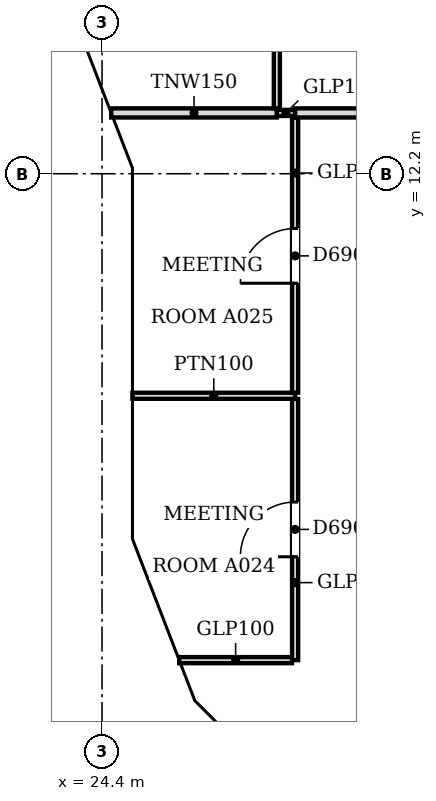
"""IFC4 building model, lengths in metres.
Left out: names, types, materials, properties, quantities, classifications, styles, units other than length and angle.
Written with IfcOpenShell. Run it as: python <this file> out.ifc"""

import sys

from ifc_helpers import new_model, si_unit, direction, frame, frame_2d, origin, place, context, subcontext, project, spatial, polyline, rectangle, outline, extrude, faceted_brep, source, transform, mapped, element, fill, save


model = new_model("IFC4")
c1 = context("Model", 3, precision=1e-05, world=origin(), true_north=direction((0.0, 1.0)))
c2 = subcontext(c1, "Body", "Model", "MODEL_VIEW")
j1 = project(units=[si_unit("LENGTHUNIT", "METRE"), si_unit("PLANEANGLEUNIT", "RADIAN")], contexts=[c1])
p1 = place(None, origin())
s1 = spatial("IfcSite", under=j1, at=p1, CompositionType="ELEMENT")
p2 = place(p1, origin())
s2 = spatial("IfcBuilding", under=s1, at=p2, CompositionType="ELEMENT")
p3 = place(p2, frame((0.0, 0.0, 197.9)))
s3 = spatial("IfcBuildingStorey", under=s2, at=p3, CompositionType="ELEMENT", Elevation=197.9)
m1 = source(origin(), c2, "Body", "Brep", [
    faceted_brep([(3.156, -0.25, 0.056), (0.106, -0.25, 3.736), (0.106, -0.25, 0.0), (3.156, -0.25, 0.0), (0.0, 0.25, 3.736), (0.053, 0.25, 3.8), (3.202, 0.25, 0.0), (0.0, 0.25, 0.0), (0.053, 0.0, 3.8), (3.202, -0.0, 0.0)], [[[0, 1, 2, 3]], [[4, 5, 6, 7]], [[6, 5, 8, 1, 0, 9]], [[5, 4, 8]], [[7, 6, 9, 3, 2]], [[7, 2, 1, 8, 4]], [[3, 9, 0]]]),
])
p4 = place(p3, frame((23.497, 15.234, 0.0), z_axis=(0.0, 0.0, 1.0), x_axis=(0.359913782069, -0.932985567668, 0.0)))
e1 = element("IfcWall", 1, at=p4, inside=s3, PredefinedType="SOLIDWALL", context=c2, shape_type="MappedRepresentation", body=[
    mapped(m1, transform((0.0, 0.0, 0.0), scale=1.0)),
])
m2 = source(origin(), c2, "Body", "SweptSolid", [
    extrude(outline(polyline([(2.671, 0.25), (0.253, 3.167), (0.253, 0.25), (2.671, 0.25)])), frame((0.0, 0.26, 0.0), z_axis=(0.0, -1.0, 0.0), x_axis=(1.0, 0.0, 0.0)), (0.0, 0.0, 1.0), 0.52),
])
p5 = place(p4, origin())
e2 = element("IfcOpeningElement", 2, at=p5, cuts=e1, PredefinedType="OPENING", context=c2, shape_type="MappedRepresentation", body=[
    mapped(m2, transform((0.0, 0.0, 0.0), scale=1.0)),
])
m3 = source(origin(), c2, "Body", "Brep", [
    faceted_brep([(6.1, -0.25, 0.0), (3.096, -0.25, 3.8), (0.047, -0.25, 0.057), (0.047, -0.25, 0.0), (0.0, 0.25, 0.0), (3.096, 0.25, 3.8), (6.053, 0.25, 0.059), (6.053, 0.25, 0.0), (6.1, -0.0, 0.0), (0.0, 0.0, 0.0)], [[[0, 1, 2, 3]], [[4, 5, 6, 7]], [[6, 5, 1, 0, 8]], [[5, 4, 9, 2, 1]], [[4, 7, 8, 0, 3, 9]], [[9, 3, 2]], [[8, 7, 6]]]),
])
p6 = place(p3, frame((24.65, 12.247, 0.0), z_axis=(0.0, 0.0, 1.0), x_axis=(0.0, -1.0, 0.0)))
e3 = element("IfcWall", 3, at=p6, inside=s3, PredefinedType="SOLIDWALL", context=c2, shape_type="MappedRepresentation", body=[
    mapped(m3, transform((0.0, 0.0, 0.0), scale=1.0)),
])
m4 = source(origin(), c2, "Body", "SweptSolid", [
    extrude(outline(polyline([(5.584, 0.25), (3.094, 3.401), (0.526, 0.25), (5.584, 0.25)])), frame((0.0, 0.26, 0.0), z_axis=(0.0, -1.0, 0.0), x_axis=(1.0, 0.0, 0.0)), (0.0, 0.0, 1.0), 0.52),
])
p7 = place(p6, origin())
e4 = element("IfcOpeningElement", 4, at=p7, cuts=e3, PredefinedType="OPENING", context=c2, shape_type="MappedRepresentation", body=[
    mapped(m4, transform((0.0, 0.0, 0.0), scale=1.0)),
])
m5 = source(origin(), c2, "Body", "Brep", [
    faceted_brep([(3.003, -0.25, 3.732), (2.95, -0.25, 3.8), (0.0, -0.25, 0.0), (3.003, -0.25, 0.0), (0.047, 0.25, 0.06), (2.898, 0.25, 3.732), (2.898, 0.25, 0.0), (0.047, 0.25, 0.0), (2.95, 0.0, 3.8), (0.0, 0.0, 0.0)], [[[0, 1, 2, 3]], [[4, 5, 6, 7]], [[8, 1, 0]], [[5, 4, 9, 2, 1, 8]], [[7, 6, 3, 2, 9]], [[7, 9, 4]], [[3, 6, 5, 8, 0]]]),
])
p8 = place(p3, frame((24.65, 6.146, 0.0), z_axis=(0.0, 0.0, 1.0), x_axis=(0.359953949349, -0.932970071518, 0.0)))
e5 = element("IfcWall", 5, at=p8, inside=s3, PredefinedType="SOLIDWALL", context=c2, shape_type="MappedRepresentation", body=[
    mapped(m5, transform((0.0, 0.0, 0.0), scale=1.0)),
])
m6 = source(origin(), c2, "Body", "SweptSolid", [
    extrude(outline(polyline([(2.75, 3.135), (0.511, 0.25), (2.75, 0.25), (2.75, 3.135)])), frame((0.0, 0.26, 0.0), z_axis=(0.0, -1.0, 0.0), x_axis=(1.0, 0.0, 0.0)), (0.0, 0.0, 1.0), 0.52),
])
p9 = place(p8, origin())
e6 = element("IfcOpeningElement", 6, at=p9, cuts=e5, PredefinedType="OPENING", context=c2, shape_type="MappedRepresentation", body=[
    mapped(m6, transform((0.0, 0.0, 0.0), scale=1.0)),
])
m7 = source(origin(), c2, "Body", "Brep", [
    faceted_brep([(2.997, -0.25, 0.0), (0.053, -0.25, 3.8), (0.0, -0.25, 3.732), (0.0, -0.25, 0.0), (0.106, 0.25, 3.732), (2.944, 0.25, 0.068), (2.944, 0.25, 0.0), (0.106, 0.25, 0.0), (0.053, 0.0, 3.8), (2.997, 0.0, 0.0)], [[[0, 1, 2, 3]], [[4, 5, 6, 7]], [[5, 4, 8, 1, 0, 9]], [[2, 1, 8]], [[7, 6, 9, 0, 3]], [[7, 3, 2, 8, 4]], [[9, 6, 5]]]),
])
p10 = place(p3, frame((25.675, 3.431, 0.0), z_axis=(0.0, 0.0, 1.0), x_axis=(0.707106781187, -0.707106781187, 0.0)))
e7 = element("IfcWall", 7, at=p10, inside=s3, PredefinedType="SOLIDWALL", context=c2, shape_type="MappedRepresentation", body=[
    mapped(m7, transform((0.0, 0.0, 0.0), scale=1.0)),
])
m8 = source(origin(), c2, "Body", "SweptSolid", [
    extrude(outline(polyline([(2.487, 0.25), (0.253, 3.134), (0.253, 0.25), (2.487, 0.25)])), frame((0.0, 0.26, 0.0), z_axis=(0.0, -1.0, 0.0), x_axis=(1.0, 0.0, 0.0)), (0.0, 0.0, 1.0), 0.52),
])
p11 = place(p10, origin())
e8 = element("IfcOpeningElement", 8, at=p11, cuts=e7, PredefinedType="OPENING", context=c2, shape_type="MappedRepresentation", body=[
    mapped(m8, transform((0.0, 0.0, 0.0), scale=1.0)),
])
p12 = place(p2, frame((0.0, 0.0, 201.7)))
s4 = spatial("IfcBuildingStorey", under=s2, at=p12, CompositionType="ELEMENT", Elevation=201.7)
m9 = source(origin(), c2, "Body", "Brep", [
    faceted_brep([(3.103, -0.25, 7.544), (0.053, -0.25, 3.864), (0.053, -0.25, 3.736), (3.103, -0.25, 0.056), (0.0, 0.25, 3.8), (3.149, 0.25, 7.6), (3.196, 0.25, 7.543), (3.196, 0.25, 0.057), (3.149, 0.25, 0.0), (3.149, -0.0, 0.0), (3.149, -0.0, 7.6), (0.0, 0.0, 3.8)], [[[0, 1, 2, 3]], [[4, 5, 6, 7, 8]], [[8, 7, 9]], [[6, 5, 10]], [[5, 4, 11, 1, 0, 10]], [[4, 8, 9, 3, 2, 11]], [[11, 2, 1]], [[3, 9, 7, 6, 10, 0]]]),
])
p13 = place(p12, frame((23.517, 15.185, -3.8), z_axis=(0.0, 0.0, 1.0), x_axis=(0.359864468756, -0.933004589553, 0.0)))
e9 = element("IfcWall", 9, at=p13, inside=s4, PredefinedType="SOLIDWALL", context=c2, shape_type="MappedRepresentation", body=[
    mapped(m9, transform((0.0, 0.0, 0.0), scale=1.0)),
])
m10 = source(origin(), c2, "Body", "SweptSolid", [
    extrude(outline(polyline([(2.949, 6.967), (0.325, 3.8), (2.949, 0.633), (2.949, 6.967)])), frame((0.0, 0.26, 0.0), z_axis=(0.0, -1.0, 0.0), x_axis=(1.0, 0.0, 0.0)), (0.0, 0.0, 1.0), 0.52),
])
p14 = place(p13, origin())
e10 = element("IfcOpeningElement", 10, at=p14, cuts=e9, PredefinedType="OPENING", context=c2, shape_type="MappedRepresentation", body=[
    mapped(m10, transform((0.0, 0.0, 0.0), scale=1.0)),
])
m11 = source(origin(), c2, "Body", "Brep", [
    faceted_brep([(0.093, -0.25, 0.057), (3.143, -0.25, 3.8), (0.093, -0.25, 7.543), (0.0, 0.25, 7.544), (0.047, 0.25, 7.6), (3.143, 0.25, 3.8), (0.047, 0.25, 0.0), (0.0, 0.25, 0.056), (0.047, 0.0, 0.0), (0.047, 0.0, 7.6)], [[[0, 1, 2]], [[3, 4, 5, 6, 7]], [[6, 5, 1, 0, 8]], [[5, 4, 9, 2, 1]], [[4, 3, 9]], [[7, 6, 8]], [[7, 8, 0, 2, 9, 3]]]),
])
p15 = place(p12, frame((24.65, 12.293, -3.8), z_axis=(0.0, 0.0, 1.0), x_axis=(0.0, -1.0, 0.0)))
e11 = element("IfcWall", 11, at=p15, inside=s4, PredefinedType="SOLIDWALL", context=c2, shape_type="MappedRepresentation", body=[
    mapped(m11, transform((0.0, 0.0, 0.0), scale=1.0)),
])
m12 = source(origin(), c2, "Body", "SweptSolid", [
    extrude(outline(polyline([(0.247, 0.641), (2.821, 3.8), (0.247, 6.959), (0.247, 0.641)])), frame((0.0, 0.26, 0.0), z_axis=(0.0, -1.0, 0.0), x_axis=(1.0, 0.0, 0.0)), (0.0, 0.0, 1.0), 0.52),
])
p16 = place(p15, origin())
e12 = element("IfcOpeningElement", 12, at=p16, cuts=e11, PredefinedType="OPENING", context=c2, shape_type="MappedRepresentation", body=[
    mapped(m12, transform((0.0, 0.0, 0.0), scale=1.0)),
])
m13 = source(origin(), c2, "Body", "Brep", [
    faceted_brep([(3.003, -0.25, 0.0), (3.05, -0.25, 0.06), (3.05, -0.25, 7.54), (3.003, -0.25, 7.6), (0.0, -0.25, 3.8), (0.0, 0.25, 3.8), (2.957, 0.25, 7.541), (2.957, 0.25, 0.059), (3.003, 0.0, 0.0), (3.003, 0.0, 7.6)], [[[0, 1, 2, 3, 4]], [[5, 6, 7]], [[1, 0, 8]], [[9, 3, 2]], [[6, 5, 4, 3, 9]], [[5, 7, 8, 0, 4]], [[1, 8, 7, 6, 9, 2]]]),
])
p17 = place(p12, frame((24.65, 9.15, -3.8), z_axis=(0.0, 0.0, 1.0), x_axis=(0.0, -1.0, 0.0)))
e13 = element("IfcWall", 13, at=p17, inside=s4, PredefinedType="SOLIDWALL", context=c2, shape_type="MappedRepresentation", body=[
    mapped(m13, transform((0.0, 0.0, 0.0), scale=1.0)),
])
m14 = source(origin(), c2, "Body", "SweptSolid", [
    extrude(outline(polyline([(2.803, 6.944), (0.319, 3.8), (2.803, 0.656), (2.803, 6.944)])), frame((0.0, 0.26, 0.0), z_axis=(0.0, -1.0, 0.0), x_axis=(1.0, 0.0, 0.0)), (0.0, 0.0, 1.0), 0.52),
])
p18 = place(p17, origin())
e14 = element("IfcOpeningElement", 14, at=p18, cuts=e13, PredefinedType="OPENING", context=c2, shape_type="MappedRepresentation", body=[
    mapped(m14, transform((0.0, 0.0, 0.0), scale=1.0)),
])
m15 = source(origin(), c2, "Body", "Brep", [
    faceted_brep([(0.047, -0.25, 0.0), (2.997, -0.25, 3.8), (0.047, -0.25, 7.6), (0.0, -0.25, 7.541), (0.0, -0.25, 0.059), (0.093, 0.25, 7.54), (2.944, 0.25, 3.868), (2.944, 0.25, 3.732), (0.093, 0.25, 0.06), (2.997, 0.0, 3.8), (0.047, 0.0, 0.0), (0.047, 0.0, 7.6)], [[[0, 1, 2, 3, 4]], [[5, 6, 7, 8]], [[8, 7, 9, 1, 0, 10]], [[6, 5, 11, 2, 1, 9]], [[3, 2, 11]], [[10, 0, 4]], [[8, 10, 4, 3, 11, 5]], [[9, 7, 6]]]),
])
p19 = place(p12, frame((24.633, 6.19, -3.8), z_axis=(0.0, 0.0, 1.0), x_axis=(0.359901446078, -0.932990326376, 0.0)))
e15 = element("IfcWall", 15, at=p19, inside=s4, PredefinedType="SOLIDWALL", context=c2, shape_type="MappedRepresentation", body=[
    mapped(m15, transform((0.0, 0.0, 0.0), scale=1.0)),
])
m16 = source(origin(), c2, "Body", "SweptSolid", [
    extrude(outline(polyline([(0.247, 0.665), (2.681, 3.8), (0.247, 6.935), (0.247, 0.665)])), frame((0.0, 0.26, 0.0), z_axis=(0.0, -1.0, 0.0), x_axis=(1.0, 0.0, 0.0)), (0.0, 0.0, 1.0), 0.52),
])
p20 = place(p19, origin())
e16 = element("IfcOpeningElement", 16, at=p20, cuts=e15, PredefinedType="OPENING", context=c2, shape_type="MappedRepresentation", body=[
    mapped(m16, transform((0.0, 0.0, 0.0), scale=1.0)),
])
m17 = source(origin(), c2, "Body", "Brep", [
    faceted_brep([(2.944, -0.25, 0.0), (2.997, -0.25, 0.068), (2.997, -0.25, 7.532), (2.944, -0.25, 7.6), (0.0, -0.25, 3.8), (0.053, 0.25, 3.868), (2.891, 0.25, 7.532), (2.891, 0.25, 0.068), (0.053, 0.25, 3.732), (2.944, 0.0, 0.0), (2.944, 0.0, 7.6), (0.0, 0.0, 3.8)], [[[0, 1, 2, 3, 4]], [[5, 6, 7, 8]], [[1, 0, 9]], [[10, 3, 2]], [[6, 5, 11, 4, 3, 10]], [[8, 7, 9, 0, 4, 11]], [[8, 11, 5]], [[1, 9, 7, 6, 10, 2]]]),
])
p21 = place(p12, frame((25.712, 3.394, -3.8), z_axis=(0.0, 0.0, 1.0), x_axis=(0.707066050402, -0.707147509625, 0.0)))
e17 = element("IfcWall", 17, at=p21, inside=s4, PredefinedType="SOLIDWALL", context=c2, shape_type="MappedRepresentation", body=[
    mapped(m17, transform((0.0, 0.0, 0.0), scale=1.0)),
])
m18 = source(origin(), c2, "Body", "SweptSolid", [
    extrude(outline(polyline([(2.744, 6.934), (0.316, 3.8), (2.744, 0.667), (2.744, 6.934)])), frame((0.0, 0.26, 0.0), z_axis=(0.0, -1.0, 0.0), x_axis=(1.0, 0.0, 0.0)), (0.0, 0.0, 1.0), 0.52),
])
p22 = place(p21, origin())
e18 = element("IfcOpeningElement", 18, at=p22, cuts=e17, PredefinedType="OPENING", context=c2, shape_type="MappedRepresentation", body=[
    mapped(m18, transform((0.0, 0.0, 0.0), scale=1.0)),
])
p23 = place(p3, frame((25.669, 4.2, 0.0), z_axis=(0.0, 0.0, 1.0), x_axis=(1.0, 0.0, 0.0)))
e19 = element("IfcWall", 19, at=p23, inside=s3, PredefinedType="PARTITIONING", context=c2, shape_type="SweptSolid", body=[
    extrude(rectangle(XDim=1.855, YDim=0.1, at=frame_2d((0.928, 0.0))), origin(), (0.0, 0.0, 1.0), 3.067),
])
p24 = place(p3, frame((27.575, 4.2, 0.0), z_axis=(0.0, 0.0, 1.0), x_axis=(0.0, 1.0, 0.0)))
e20 = element("IfcWall", 20, at=p24, inside=s3, PredefinedType="PARTITIONING", context=c2, shape_type="SweptSolid", body=[
    extrude(rectangle(XDim=4.297, YDim=0.1, at=frame_2d((2.148, 0.0))), origin(), (0.0, 0.0, 1.0), 3.067),
])
m19 = source(origin(), c2, "Body", "SweptSolid", [
    extrude(rectangle(XDim=0.9, YDim=2.1, at=frame_2d((0.45, 1.05))), frame((0.0, 0.06, 0.0), z_axis=(0.0, -1.0, 0.0), x_axis=(1.0, 0.0, 0.0)), (0.0, 0.0, 1.0), 0.12),
])
p25 = place(p24, frame((1.7, 0.0, 0.0)))
e21 = element("IfcOpeningElement", 21, at=p25, cuts=e20, PredefinedType="OPENING", context=c2, shape_type="MappedRepresentation", body=[
    mapped(m19, transform((0.0, 0.0, 0.0), scale=1.0)),
])
p26 = place(p3, frame((24.9, 8.548, 0.0), z_axis=(0.0, 0.0, 1.0), x_axis=(1.0, 0.0, 0.0)))
e22 = element("IfcWall", 22, at=p26, inside=s3, PredefinedType="PARTITIONING", context=c2, shape_type="SweptSolid", body=[
    extrude(rectangle(XDim=2.675, YDim=0.1, at=frame_2d((1.337, 0.0))), origin(), (0.0, 0.0, 1.0), 3.067),
])
p27 = place(p3, frame((27.575, 8.599, 0.0), z_axis=(0.0, 0.0, 1.0), x_axis=(0.0, 1.0, 0.0)))
e23 = element("IfcWall", 23, at=p27, inside=s3, PredefinedType="PARTITIONING", context=c2, shape_type="SweptSolid", body=[
    extrude(rectangle(XDim=4.525, YDim=0.1, at=frame_2d((2.263, 0.0))), origin(), (0.0, 0.0, 1.0), 3.067),
])
p28 = place(p27, frame((1.8, 0.0, 0.0)))
e24 = element("IfcOpeningElement", 24, at=p28, cuts=e23, PredefinedType="OPENING", context=c2, shape_type="MappedRepresentation", body=[
    mapped(m19, transform((0.0, 0.0, 0.0), scale=1.0)),
])
p29 = place(p3, frame((24.55, 13.2, 0.0), z_axis=(0.0, 0.0, 1.0), x_axis=(1.0, 0.0, 0.0)))
e25 = element("IfcWall", 25, at=p29, inside=s3, PredefinedType="PARTITIONING", context=c2, shape_type="SweptSolid", body=[
    extrude(rectangle(XDim=2.725, YDim=0.15, at=frame_2d((1.362, 0.0))), origin(), (0.0, 0.0, 1.0), 3.067),
])
p30 = place(p3, frame((27.276, 13.2, 0.0), z_axis=(0.0, 0.0, 1.0), x_axis=(1.0, 0.0, 0.0)))
e26 = element("IfcWall", 26, at=p30, inside=s3, PredefinedType="PARTITIONING", context=c2, shape_type="SweptSolid", body=[
    extrude(rectangle(XDim=0.298, YDim=0.1, at=frame_2d((0.149, 0.0))), origin(), (0.0, 0.0, 1.0), 3.067),
])
p31 = place(p3, frame((27.575, 13.2, 0.0), z_axis=(0.0, 0.0, 1.0), x_axis=(1.0, 0.0, 0.0)))
e27 = element("IfcWall", 27, at=p31, inside=s3, PredefinedType="PARTITIONING", context=c2, shape_type="SweptSolid", body=[
    extrude(rectangle(XDim=17.349, YDim=0.15, at=frame_2d((8.675, 0.0))), origin(), (0.0, 0.0, 1.0), 3.067),
])
p32 = place(p3, frame((27.275, 13.276, 0.0), z_axis=(0.0, 0.0, 1.0), x_axis=(0.0, 1.0, 0.0)))
e28 = element("IfcWall", 28, at=p32, inside=s3, PredefinedType="PARTITIONING", context=c2, shape_type="SweptSolid", body=[
    extrude(rectangle(XDim=5.448, YDim=0.1, at=frame_2d((2.724, 0.0))), origin(), (0.0, 0.0, 1.0), 3.067),
])
p33 = place(p32, frame((2.3, 0.0, 0.0)))
e29 = element("IfcOpeningElement", 29, at=p33, cuts=e28, PredefinedType="OPENING", context=c2, shape_type="MappedRepresentation", body=[
    mapped(m19, transform((0.0, 0.0, 0.0), scale=1.0)),
])
m20 = source(origin(), c2, "Body", "SweptSolid", [
    extrude(rectangle(XDim=0.9, YDim=2.1, at=frame_2d((0.45, 1.05))), frame((0.0, 0.025, 0.0), z_axis=(0.0, -1.0, 0.0), x_axis=(1.0, 0.0, 0.0)), (0.0, 0.0, 1.0), 0.05),
])
p34 = place(p28, origin())
e30 = element("IfcDoor", 30, at=p34, inside=s3, OperationType="SINGLE_SWING_LEFT", PredefinedType="DOOR", context=c2, shape_type="MappedRepresentation", body=[
    mapped(m20, transform((0.0, 0.0, 0.0), scale=1.0)),
])
fill(e24, e30)
p35 = place(p25, origin())
e31 = element("IfcDoor", 31, at=p35, inside=s3, OperationType="SINGLE_SWING_LEFT", PredefinedType="DOOR", context=c2, shape_type="MappedRepresentation", body=[
    mapped(m20, transform((0.0, 0.0, 0.0), scale=1.0)),
])
fill(e21, e31)
save(model, sys.argv[1])
